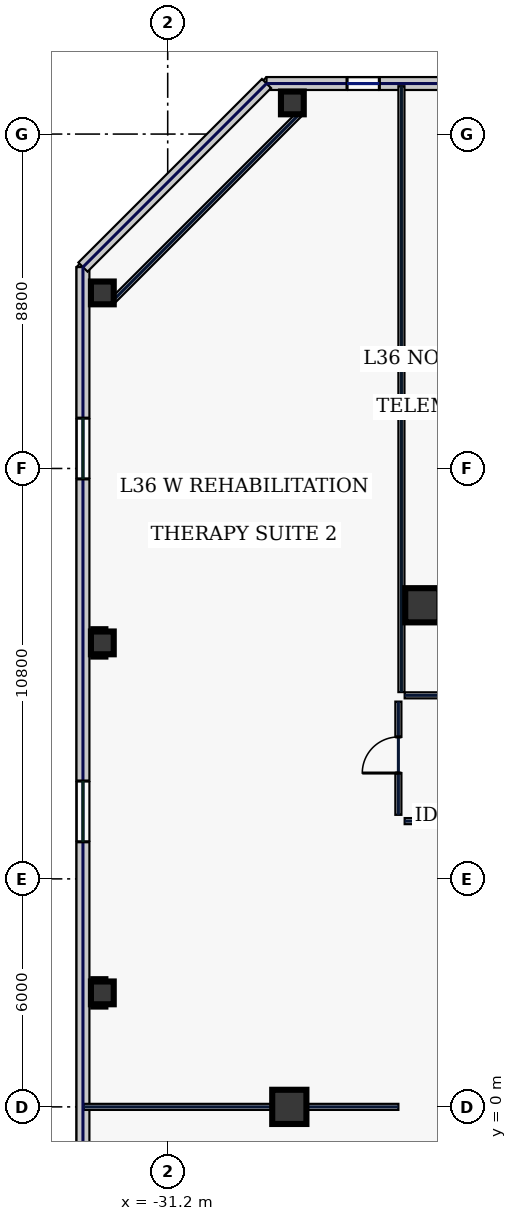
"""IFC4 building model, lengths in metres.
Left out: names, types, materials, properties, quantities, classifications, styles, units other than length and angle.
Written with IfcOpenShell. Run it as: python <this file> out.ifc"""

import sys

from ifc_helpers import new_model, si_unit, direction, frame, frame_2d, origin, origin_2d, place, context, subcontext, project, spatial, rectangle, hollow_rectangle, extrude, element, fill, save


model = new_model("IFC4")
c1 = context("Model", 3, precision=1e-05, world=origin(), true_north=direction((0.0, 1.0)))
c2 = subcontext(c1, "Body", "Model", "MODEL_VIEW")
j1 = project(units=[si_unit("LENGTHUNIT", "METRE"), si_unit("PLANEANGLEUNIT", "RADIAN")], contexts=[c1])
p1 = place(None, origin())
s1 = spatial("IfcSite", under=j1, at=p1, CompositionType="ELEMENT")
p2 = place(p1, origin())
s2 = spatial("IfcBuilding", under=s1, at=p2, CompositionType="ELEMENT")
p3 = place(p2, frame((0.0, 0.0, 160.2)))
s3 = spatial("IfcBuildingStorey", under=s2, at=p3, CompositionType="ELEMENT", Elevation=160.2)
for number, where, z_axis, x_axis in (
    (1, (-24.5, 13.2, 0.0), (0.0, 0.0, 1.0), (1.0, 0.0, 0.0)),
    (2, (-28.0, 0.0, 0.0), (0.0, 0.0, 1.0), (1.0, 0.0, 0.0)),
):
    element("IfcColumn", number, at=place(p3, frame(where, z_axis=z_axis, x_axis=x_axis)), inside=s3, PredefinedType="COLUMN", context=c2, shape_type="SweptSolid", body=[
        extrude(hollow_rectangle(XDim=0.9, YDim=0.9, WallThickness=0.04, at=origin_2d()), origin(), (0.0, 0.0, 1.0), 3.74),
    ])
for number, where, z_axis, x_axis in (
    (3, (-27.92, 26.42, 0.0), (0.0, 0.0, 1.0), (1.0, 0.0, 0.0)),
    (4, (-32.92, 21.42, 0.0), (0.0, 0.0, 1.0), (1.0, 0.0, 0.0)),
    (5, (-32.92, 12.21, 0.0), (0.0, 0.0, 1.0), (1.0, 0.0, 0.0)),
    (6, (-32.92, 3.0, 0.0), (0.0, 0.0, 1.0), (1.0, 0.0, 0.0)),
):
    element("IfcColumn", number, at=place(p3, frame(where, z_axis=z_axis, x_axis=x_axis)), inside=s3, PredefinedType="COLUMN", context=c2, shape_type="SweptSolid", body=[
        extrude(hollow_rectangle(XDim=0.6, YDim=0.6, WallThickness=0.028, at=origin_2d()), origin(), (0.0, 0.0, 1.0), 3.74),
    ])
p4 = place(p3, frame((-8.663, 26.93, 0.0), z_axis=(0.0, 0.0, 1.0), x_axis=(-1.0, 0.0, 0.0)))
e7 = element("IfcWall", 7, at=p4, inside=s3, PredefinedType="STANDARD", context=c2, shape_type="SweptSolid", body=[
    extrude(rectangle(XDim=19.937, YDim=0.34, at=frame_2d((9.969, 0.0))), origin(), (0.0, 0.0, 1.0), 3.74),
])
p5 = place(p4, frame((16.968, 0.0, 0.7)))
e8 = element("IfcOpeningElement", 8, at=p5, cuts=e7, PredefinedType="OPENING", context=c2, shape_type="SweptSolid", body=[
    extrude(rectangle(XDim=0.85, YDim=1.85, at=frame_2d((0.425, 0.925))), frame((0.0, 0.18, 0.0), z_axis=(0.0, -1.0, 0.0), x_axis=(1.0, 0.0, 0.0)), (0.0, 0.0, 1.0), 0.36),
])
p6 = place(p4, frame((12.983, 0.0, 0.7)))
e9 = element("IfcOpeningElement", 9, at=p6, cuts=e7, PredefinedType="OPENING", context=c2, shape_type="SweptSolid", body=[
    extrude(rectangle(XDim=0.85, YDim=1.85, at=frame_2d((0.425, 0.925))), frame((0.0, 0.18, 0.0), z_axis=(0.0, -1.0, 0.0), x_axis=(1.0, 0.0, 0.0)), (0.0, 0.0, 1.0), 0.36),
])
p7 = place(p4, frame((7.355, 0.0, 0.7)))
e10 = element("IfcOpeningElement", 10, at=p7, cuts=e7, PredefinedType="OPENING", context=c2, shape_type="SweptSolid", body=[
    extrude(rectangle(XDim=1.8, YDim=2.2, at=frame_2d((0.9, 1.1))), frame((0.0, 0.18, 0.0), z_axis=(0.0, -1.0, 0.0), x_axis=(1.0, 0.0, 0.0)), (0.0, 0.0, 1.0), 0.36),
])
p8 = place(p4, frame((4.321, 0.0, 0.7)))
e11 = element("IfcOpeningElement", 11, at=p8, cuts=e7, PredefinedType="OPENING", context=c2, shape_type="SweptSolid", body=[
    extrude(rectangle(XDim=0.85, YDim=1.85, at=frame_2d((0.425, 0.925))), frame((0.0, 0.18, 0.0), z_axis=(0.0, -1.0, 0.0), x_axis=(1.0, 0.0, 0.0)), (0.0, 0.0, 1.0), 0.36),
])
p9 = place(p3, frame((-33.43, 22.1, 0.0), z_axis=(0.0, 0.0, 1.0), x_axis=(0.0, -1.0, 0.0)))
e12 = element("IfcWall", 12, at=p9, inside=s3, PredefinedType="STANDARD", context=c2, shape_type="SweptSolid", body=[
    extrude(rectangle(XDim=38.2, YDim=0.34, at=frame_2d((19.1, 0.0))), origin(), (0.0, 0.0, 1.0), 3.74),
])
p10 = place(p9, frame((3.975, 0.0, 0.58)))
e13 = element("IfcOpeningElement", 13, at=p10, cuts=e12, PredefinedType="OPENING", context=c2, shape_type="SweptSolid", body=[
    extrude(rectangle(XDim=1.6, YDim=2.3, at=frame_2d((0.8, 1.15))), frame((0.0, 0.18, 0.0), z_axis=(0.0, -1.0, 0.0), x_axis=(1.0, 0.0, 0.0)), (0.0, 0.0, 1.0), 0.36),
])
p11 = place(p9, frame((13.525, 0.0, 0.58)))
e14 = element("IfcOpeningElement", 14, at=p11, cuts=e12, PredefinedType="OPENING", context=c2, shape_type="SweptSolid", body=[
    extrude(rectangle(XDim=1.6, YDim=2.3, at=frame_2d((0.8, 1.15))), frame((0.0, 0.18, 0.0), z_axis=(0.0, -1.0, 0.0), x_axis=(1.0, 0.0, 0.0)), (0.0, 0.0, 1.0), 0.36),
])
p12 = place(p9, frame((23.075, 0.0, 0.58)))
e15 = element("IfcOpeningElement", 15, at=p12, cuts=e12, PredefinedType="OPENING", context=c2, shape_type="SweptSolid", body=[
    extrude(rectangle(XDim=1.6, YDim=2.3, at=frame_2d((0.8, 1.15))), frame((0.0, 0.18, 0.0), z_axis=(0.0, -1.0, 0.0), x_axis=(1.0, 0.0, 0.0)), (0.0, 0.0, 1.0), 0.36),
])
p13 = place(p9, frame((32.625, 0.0, 0.58)))
e16 = element("IfcOpeningElement", 16, at=p13, cuts=e12, PredefinedType="OPENING", context=c2, shape_type="SweptSolid", body=[
    extrude(rectangle(XDim=1.6, YDim=2.3, at=frame_2d((0.8, 1.15))), frame((0.0, 0.18, 0.0), z_axis=(0.0, -1.0, 0.0), x_axis=(1.0, 0.0, 0.0)), (0.0, 0.0, 1.0), 0.36),
])
p14 = place(p3, frame((-28.6, 26.93, 0.0), z_axis=(0.0, 0.0, 1.0), x_axis=(-0.707106781187, -0.707106781187, 0.0)))
e17 = element("IfcWall", 17, at=p14, inside=s3, PredefinedType="STANDARD", context=c2, shape_type="SweptSolid", body=[
    extrude(rectangle(XDim=6.83, YDim=0.34, at=frame_2d((3.415, 0.0))), origin(), (0.0, 0.0, 1.0), 3.74),
])
p15 = place(p3, frame((-27.68, 26.18, 0.0), z_axis=(0.0, 0.0, 1.0), x_axis=(-0.707106781187, -0.707106781187, 0.0)))
e18 = element("IfcWall", 18, at=p15, inside=s3, PredefinedType="PARTITIONING", context=c2, shape_type="SweptSolid", body=[
    extrude(rectangle(XDim=7.071, YDim=0.16, at=frame_2d((3.536, 0.0))), origin(), (0.0, 0.0, 1.0), 3.74),
])
p16 = place(p3, frame((-10.715, 7.52, 0.0), z_axis=(0.0, 0.0, 1.0), x_axis=(-1.0, 0.0, 0.0)))
e19 = element("IfcWall", 19, at=p16, inside=s3, PredefinedType="PARTITIONING", context=c2, shape_type="SweptSolid", body=[
    extrude(rectangle(XDim=14.25, YDim=0.16, at=frame_2d((7.125, 0.0))), origin(), (0.0, 0.0, 1.0), 3.74),
])
p17 = place(p3, frame((-25.13, 7.685, 0.0), z_axis=(0.0, 0.0, 1.0), x_axis=(0.0, 1.0, 0.0)))
e20 = element("IfcWall", 20, at=p17, inside=s3, PredefinedType="PARTITIONING", context=c2, shape_type="SweptSolid", body=[
    extrude(rectangle(XDim=2.98, YDim=0.16, at=frame_2d((1.49, 0.0))), origin(), (0.0, 0.0, 1.0), 3.74),
])
p18 = place(p17, frame((1.1, 0.0, 0.0)))
e21 = element("IfcOpeningElement", 21, at=p18, cuts=e20, PredefinedType="OPENING", context=c2, shape_type="SweptSolid", body=[
    extrude(rectangle(XDim=0.95, YDim=2.2, at=frame_2d((0.475, 1.1))), frame((0.0, 0.09, 0.0), z_axis=(0.0, -1.0, 0.0), x_axis=(1.0, 0.0, 0.0)), (0.0, 0.0, 1.0), 0.18),
])
p19 = place(p3, frame((-24.965, 10.83, 0.0), z_axis=(0.0, 0.0, 1.0), x_axis=(1.0, 0.0, 0.0)))
e22 = element("IfcWall", 22, at=p19, inside=s3, PredefinedType="PARTITIONING", context=c2, shape_type="SweptSolid", body=[
    extrude(rectangle(XDim=49.93, YDim=0.16, at=frame_2d((24.965, 0.0))), origin(), (0.0, 0.0, 1.0), 3.74),
])
p20 = place(p19, frame((1.869, 0.0, 0.0)))
e23 = element("IfcOpeningElement", 23, at=p20, cuts=e22, PredefinedType="OPENING", context=c2, shape_type="SweptSolid", body=[
    extrude(rectangle(XDim=1.3, YDim=2.2, at=frame_2d((0.65, 1.1))), frame((0.0, 0.09, 0.0), z_axis=(0.0, -1.0, 0.0), x_axis=(1.0, 0.0, 0.0)), (0.0, 0.0, 1.0), 0.18),
])
p21 = place(p19, frame((8.305, 0.0, 0.0)))
e24 = element("IfcOpeningElement", 24, at=p21, cuts=e22, PredefinedType="OPENING", context=c2, shape_type="SweptSolid", body=[
    extrude(rectangle(XDim=0.95, YDim=2.2, at=frame_2d((0.475, 1.1))), frame((0.0, 0.09, 0.0), z_axis=(0.0, -1.0, 0.0), x_axis=(1.0, 0.0, 0.0)), (0.0, 0.0, 1.0), 0.18),
])
p22 = place(p19, frame((15.705, 0.0, 0.0)))
e25 = element("IfcOpeningElement", 25, at=p22, cuts=e22, PredefinedType="OPENING", context=c2, shape_type="SweptSolid", body=[
    extrude(rectangle(XDim=1.15, YDim=2.2, at=frame_2d((0.575, 1.1))), frame((0.0, 0.09, 0.0), z_axis=(0.0, -1.0, 0.0), x_axis=(1.0, 0.0, 0.0)), (0.0, 0.0, 1.0), 0.18),
])
p23 = place(p19, frame((23.1, 0.0, 0.0)))
e26 = element("IfcOpeningElement", 26, at=p23, cuts=e22, PredefinedType="OPENING", context=c2, shape_type="SweptSolid", body=[
    extrude(rectangle(XDim=1.05, YDim=2.2, at=frame_2d((0.525, 1.1))), frame((0.0, 0.09, 0.0), z_axis=(0.0, -1.0, 0.0), x_axis=(1.0, 0.0, 0.0)), (0.0, 0.0, 1.0), 0.18),
])
p24 = place(p19, frame((30.9, 0.0, 0.0)))
e27 = element("IfcOpeningElement", 27, at=p24, cuts=e22, PredefinedType="OPENING", context=c2, shape_type="SweptSolid", body=[
    extrude(rectangle(XDim=0.95, YDim=2.2, at=frame_2d((0.475, 1.1))), frame((0.0, 0.09, 0.0), z_axis=(0.0, -1.0, 0.0), x_axis=(1.0, 0.0, 0.0)), (0.0, 0.0, 1.0), 0.18),
])
p25 = place(p19, frame((37.495, 0.0, 0.0)))
e28 = element("IfcOpeningElement", 28, at=p25, cuts=e22, PredefinedType="OPENING", context=c2, shape_type="SweptSolid", body=[
    extrude(rectangle(XDim=1.3, YDim=2.2, at=frame_2d((0.65, 1.1))), frame((0.0, 0.09, 0.0), z_axis=(0.0, -1.0, 0.0), x_axis=(1.0, 0.0, 0.0)), (0.0, 0.0, 1.0), 0.18),
])
p26 = place(p19, frame((42.695, 0.0, 0.0)))
e29 = element("IfcOpeningElement", 29, at=p26, cuts=e22, PredefinedType="OPENING", context=c2, shape_type="SweptSolid", body=[
    extrude(rectangle(XDim=1.3, YDim=2.2, at=frame_2d((0.65, 1.1))), frame((0.0, 0.09, 0.0), z_axis=(0.0, -1.0, 0.0), x_axis=(1.0, 0.0, 0.0)), (0.0, 0.0, 1.0), 0.18),
])
p27 = place(p19, frame((46.931, 0.0, 0.0)))
e30 = element("IfcOpeningElement", 30, at=p27, cuts=e22, PredefinedType="OPENING", context=c2, shape_type="SweptSolid", body=[
    extrude(rectangle(XDim=1.45, YDim=2.2, at=frame_2d((0.725, 1.1))), frame((0.0, 0.09, 0.0), z_axis=(0.0, -1.0, 0.0), x_axis=(1.0, 0.0, 0.0)), (0.0, 0.0, 1.0), 0.18),
])
p28 = place(p3, frame((-25.05, 10.915, 0.0), z_axis=(0.0, 0.0, 1.0), x_axis=(0.0, 1.0, 0.0)))
e31 = element("IfcWall", 31, at=p28, inside=s3, PredefinedType="PARTITIONING", context=c2, shape_type="SweptSolid", body=[
    extrude(rectangle(XDim=15.945, YDim=0.16, at=frame_2d((7.973, 0.0))), origin(), (0.0, 0.0, 1.0), 3.285),
])
p29 = place(p3, frame((-33.41, 0.0, 0.0), z_axis=(0.0, 0.0, 1.0), x_axis=(1.0, 0.0, 0.0)))
e32 = element("IfcWall", 32, at=p29, inside=s3, PredefinedType="PARTITIONING", context=c2, shape_type="SweptSolid", body=[
    extrude(rectangle(XDim=8.28, YDim=0.16, at=frame_2d((4.14, 0.0))), origin(), (0.0, 0.0, 1.0), 3.74),
])
p30 = place(p5, origin())
e33 = element("IfcWindow", 33, at=p30, inside=s3, PartitioningType="SINGLE_PANEL", PredefinedType="WINDOW", context=c2, shape_type="SweptSolid", body=[
    extrude(rectangle(XDim=0.85, YDim=1.85, at=frame_2d((0.425, 0.925))), frame((0.0, 0.03, 0.0), z_axis=(0.0, -1.0, 0.0), x_axis=(1.0, 0.0, 0.0)), (0.0, 0.0, 1.0), 0.06),
])
fill(e8, e33)
p31 = place(p10, origin())
e34 = element("IfcWindow", 34, at=p31, inside=s3, PartitioningType="SINGLE_PANEL", PredefinedType="WINDOW", context=c2, shape_type="SweptSolid", body=[
    extrude(rectangle(XDim=1.6, YDim=2.3, at=frame_2d((0.8, 1.15))), frame((0.0, 0.03, 0.0), z_axis=(0.0, -1.0, 0.0), x_axis=(1.0, 0.0, 0.0)), (0.0, 0.0, 1.0), 0.06),
])
fill(e13, e34)
p32 = place(p11, origin())
e35 = element("IfcWindow", 35, at=p32, inside=s3, PartitioningType="SINGLE_PANEL", PredefinedType="WINDOW", context=c2, shape_type="SweptSolid", body=[
    extrude(rectangle(XDim=1.6, YDim=2.3, at=frame_2d((0.8, 1.15))), frame((0.0, 0.03, 0.0), z_axis=(0.0, -1.0, 0.0), x_axis=(1.0, 0.0, 0.0)), (0.0, 0.0, 1.0), 0.06),
])
fill(e14, e35)
p33 = place(p18, origin())
e36 = element("IfcDoor", 36, at=p33, inside=s3, OperationType="SINGLE_SWING_LEFT", PredefinedType="DOOR", context=c2, shape_type="SweptSolid", body=[
    extrude(rectangle(XDim=0.95, YDim=2.2, at=frame_2d((0.475, 1.1))), frame((0.0, 0.025, 0.0), z_axis=(0.0, -1.0, 0.0), x_axis=(1.0, 0.0, 0.0)), (0.0, 0.0, 1.0), 0.05),
])
fill(e21, e36)
save(model, sys.argv[1])
